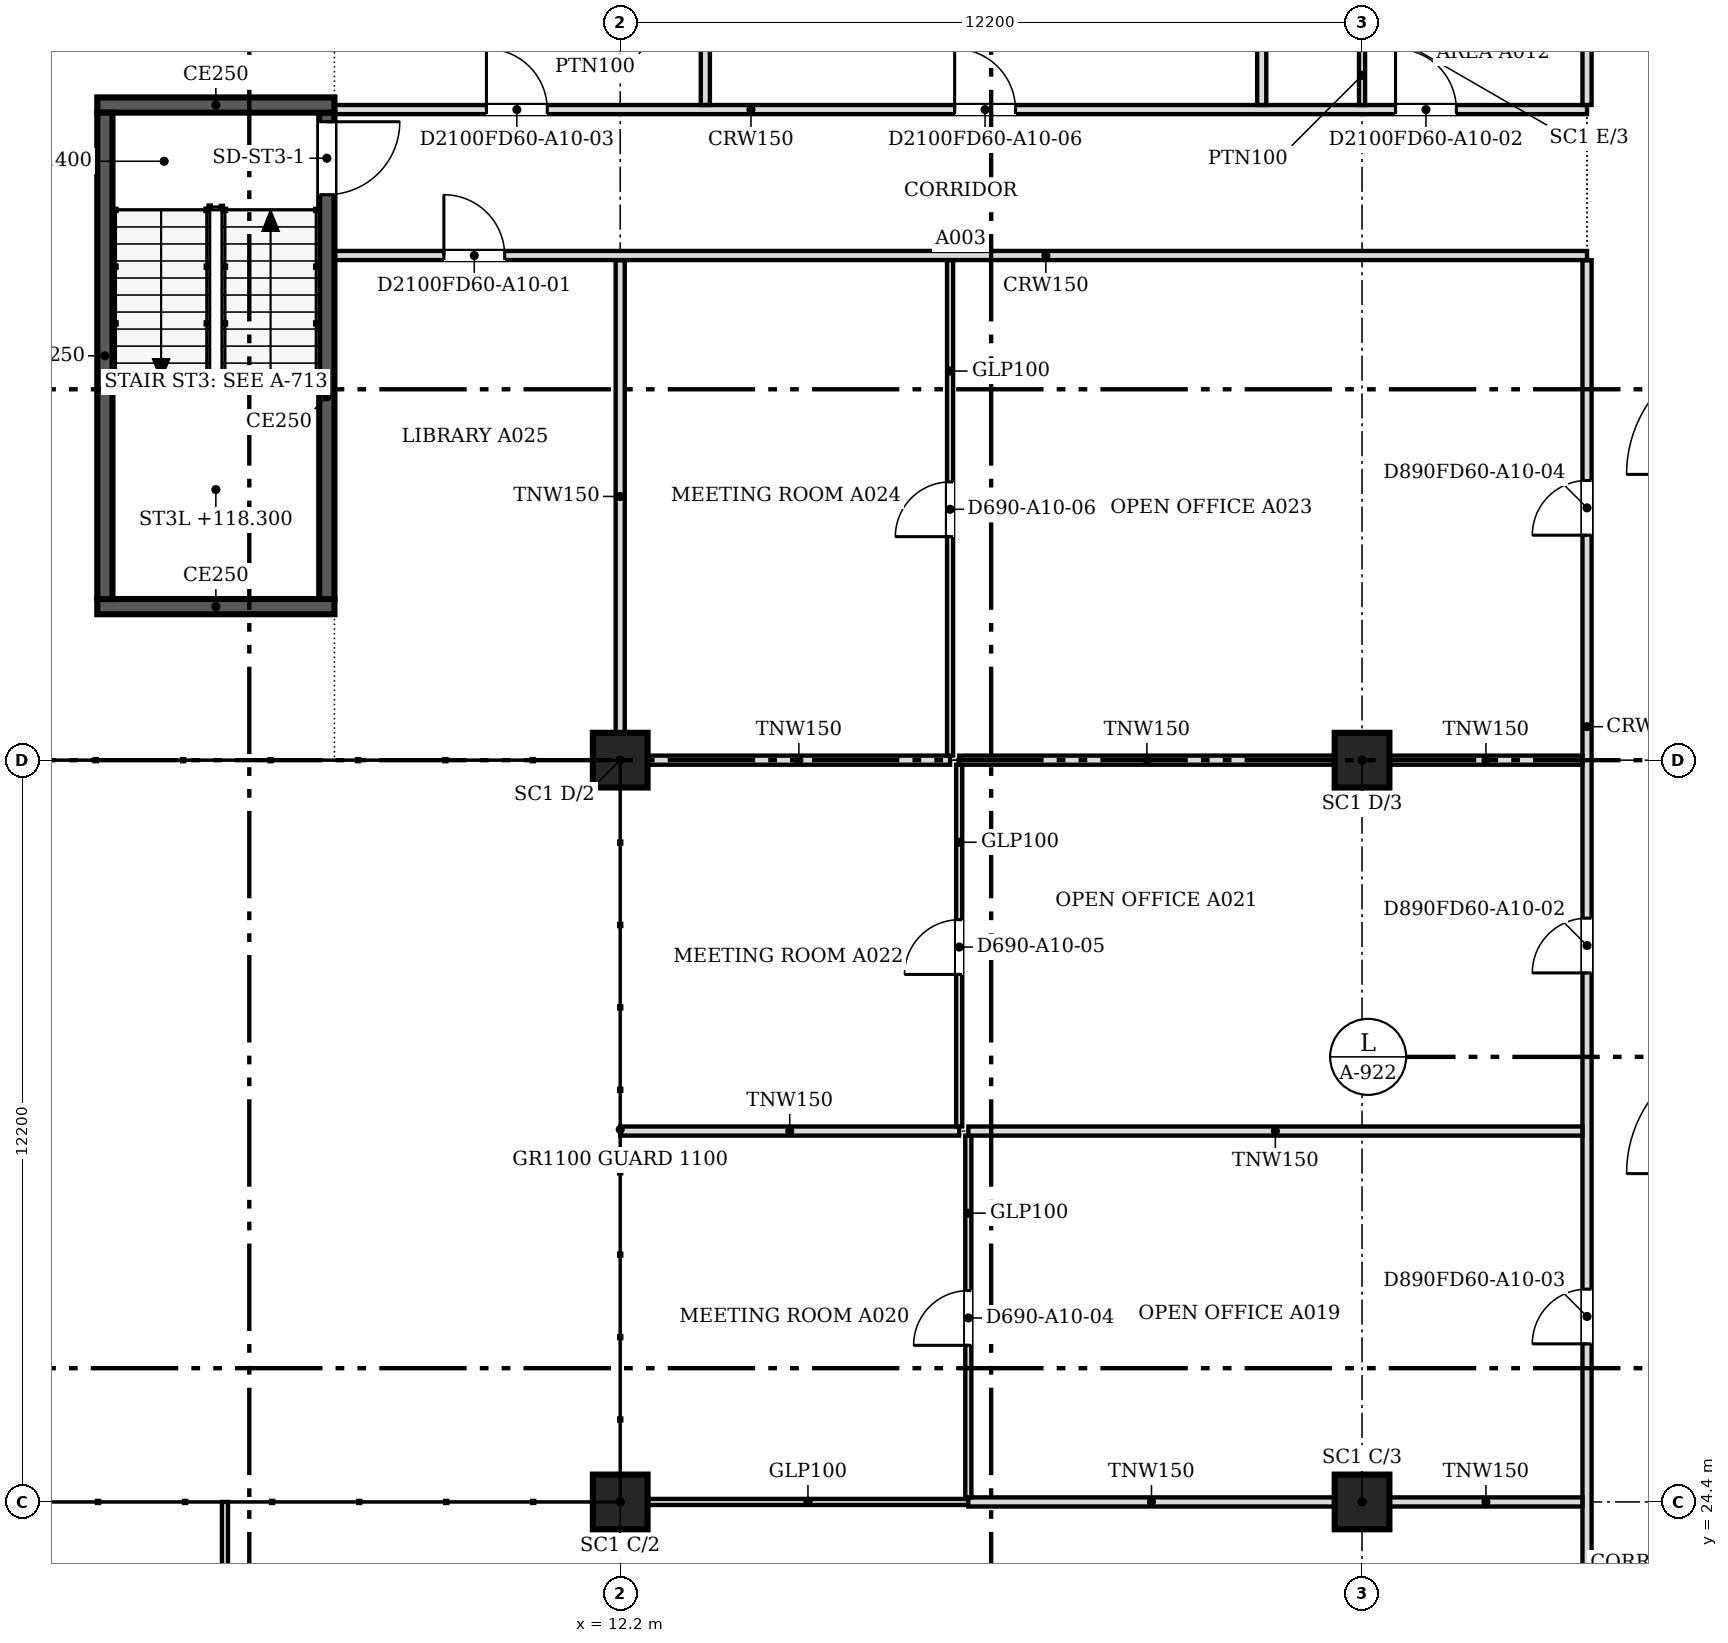
"""IFC4 building model, lengths in metres.
Left out: names, types, materials, properties, quantities, classifications, styles, units other than length and angle.
Written with IfcOpenShell. Run it as: python <this file> out.ifc"""

import sys

from ifc_helpers import new_model, si_unit, direction, frame, frame_2d, origin, origin_2d, place, context, subcontext, project, spatial, rectangle, extrude, source, transform, mapped, element, fill, save


model = new_model("IFC4")
c1 = context("Model", 3, precision=1e-05, world=origin(), true_north=direction((0.0, 1.0)))
c2 = subcontext(c1, "Body", "Model", "MODEL_VIEW")
j1 = project(units=[si_unit("LENGTHUNIT", "METRE"), si_unit("PLANEANGLEUNIT", "RADIAN")], contexts=[c1])
p1 = place(None, origin())
s1 = spatial("IfcSite", under=j1, at=p1, CompositionType="ELEMENT")
p2 = place(p1, origin())
s2 = spatial("IfcBuilding", under=s1, at=p2, CompositionType="ELEMENT")
p3 = place(p2, frame((0.0, 0.0, 116.4)))
s3 = spatial("IfcBuildingStorey", under=s2, at=p3, CompositionType="ELEMENT", Elevation=116.4)
for number, where, z_axis, x_axis in (
    (1, (12.2, 24.4, 0.0), (0.0, 0.0, 1.0), (1.0, 0.0, 0.0)),
    (2, (12.2, 36.6, 0.0), (0.0, 0.0, 1.0), (1.0, 0.0, 0.0)),
    (3, (24.4, 24.4, 0.0), (0.0, 0.0, 1.0), (1.0, 0.0, 0.0)),
    (4, (24.4, 36.6, 0.0), (0.0, 0.0, 1.0), (1.0, 0.0, 0.0)),
):
    element("IfcColumn", number, at=place(p3, frame(where, z_axis=z_axis, x_axis=x_axis)), inside=s3, PredefinedType="COLUMN", context=c2, shape_type="SweptSolid", body=[
        extrude(rectangle(XDim=0.9, YDim=0.9, at=origin_2d()), origin(), (0.0, 0.0, 1.0), 3.6),
    ])
p4 = place(p3, frame((7.5, 39.125, 0.0), z_axis=(0.0, 0.0, 1.0), x_axis=(-1.0, 0.0, 0.0)))
e5 = element("IfcWall", 5, at=p4, inside=s3, PredefinedType="SOLIDWALL", context=c2, shape_type="SweptSolid", body=[
    extrude(rectangle(XDim=3.9, YDim=0.25, at=frame_2d((1.95, 0.0))), origin(), (0.0, 0.0, 1.0), 3.8),
])
p5 = place(p3, frame((3.725, 39.25, 0.0), z_axis=(0.0, 0.0, 1.0), x_axis=(0.0, 1.0, 0.0)))
e6 = element("IfcWall", 6, at=p5, inside=s3, PredefinedType="SOLIDWALL", context=c2, shape_type="SweptSolid", body=[
    extrude(rectangle(XDim=8.0, YDim=0.25, at=frame_2d((4.0, 0.0))), origin(), (0.0, 0.0, 1.0), 3.8),
])
p6 = place(p3, frame((3.6, 47.375, 0.0), z_axis=(0.0, 0.0, 1.0), x_axis=(1.0, 0.0, 0.0)))
e7 = element("IfcWall", 7, at=p6, inside=s3, PredefinedType="SOLIDWALL", context=c2, shape_type="SweptSolid", body=[
    extrude(rectangle(XDim=3.9, YDim=0.25, at=frame_2d((1.95, 0.0))), origin(), (0.0, 0.0, 1.0), 3.8),
])
p7 = place(p3, frame((7.375, 47.25, 0.0), z_axis=(0.0, 0.0, 1.0), x_axis=(0.0, -1.0, 0.0)))
e8 = element("IfcWall", 8, at=p7, inside=s3, PredefinedType="SOLIDWALL", context=c2, shape_type="SweptSolid", body=[
    extrude(rectangle(XDim=8.0, YDim=0.25, at=frame_2d((4.0, 0.0))), origin(), (0.0, 0.0, 1.0), 3.8),
])
m1 = source(origin(), c2, "Body", "SweptSolid", [
    extrude(rectangle(XDim=1.2, YDim=2.1, at=frame_2d((0.6, 1.05))), frame((0.0, 0.135, 0.0), z_axis=(0.0, -1.0, 0.0), x_axis=(1.0, 0.0, 0.0)), (0.0, 0.0, 1.0), 0.27),
])
p8 = place(p7, frame((0.15, 0.0, 0.0)))
e9 = element("IfcOpeningElement", 9, at=p8, cuts=e8, PredefinedType="OPENING", context=c2, shape_type="MappedRepresentation", body=[
    mapped(m1, transform((0.0, 0.0, 0.0), scale=1.0)),
])
p9 = place(p3, frame((28.1, 18.8, 0.0), z_axis=(0.0, 0.0, 1.0), x_axis=(0.0, 1.0, 0.0)))
e10 = element("IfcWall", 10, at=p9, inside=s3, PredefinedType="PARTITIONING", context=c2, shape_type="SweptSolid", body=[
    extrude(rectangle(XDim=26.024, YDim=0.15, at=frame_2d((13.012, 0.0))), origin(), (0.0, 0.0, 1.0), 3.067),
])
m2 = source(origin(), c2, "Body", "SweptSolid", [
    extrude(rectangle(XDim=0.9, YDim=2.1, at=frame_2d((0.45, 1.05))), frame((0.0, 0.085, 0.0), z_axis=(0.0, -1.0, 0.0), x_axis=(1.0, 0.0, 0.0)), (0.0, 0.0, 1.0), 0.17),
])
p10 = place(p9, frame((1.1, 0.0, 0.0)))
e11 = element("IfcOpeningElement", 11, at=p10, cuts=e10, PredefinedType="OPENING", context=c2, shape_type="MappedRepresentation", body=[
    mapped(m2, transform((0.0, 0.0, 0.0), scale=1.0)),
])
p11 = place(p9, frame((14.301, 0.0, 0.0)))
e12 = element("IfcOpeningElement", 12, at=p11, cuts=e10, PredefinedType="OPENING", context=c2, shape_type="MappedRepresentation", body=[
    mapped(m2, transform((0.0, 0.0, 0.0), scale=1.0)),
])
p12 = place(p9, frame((8.2, 0.0, 0.0)))
e13 = element("IfcOpeningElement", 13, at=p12, cuts=e10, PredefinedType="OPENING", context=c2, shape_type="MappedRepresentation", body=[
    mapped(m2, transform((0.0, 0.0, 0.0), scale=1.0)),
])
p13 = place(p9, frame((21.5, 0.0, 0.0)))
e14 = element("IfcOpeningElement", 14, at=p13, cuts=e10, PredefinedType="OPENING", context=c2, shape_type="MappedRepresentation", body=[
    mapped(m2, transform((0.0, 0.0, 0.0), scale=1.0)),
])
p14 = place(p3, frame((5.7, 18.99, 0.0), z_axis=(0.0, 0.0, 1.0), x_axis=(0.0, 1.0, 0.0)))
e15 = element("IfcWall", 15, at=p14, inside=s3, PredefinedType="PARTITIONING", context=c2, shape_type="SweptSolid", body=[
    extrude(rectangle(XDim=5.41, YDim=0.1, at=frame_2d((2.705, 0.0))), origin(), (0.0, 0.0, 1.0), 3.067),
])
m3 = source(origin(), c2, "Body", "SweptSolid", [
    extrude(rectangle(XDim=0.9, YDim=2.1, at=frame_2d((0.45, 1.05))), frame((0.0, 0.06, 0.0), z_axis=(0.0, -1.0, 0.0), x_axis=(1.0, 0.0, 0.0)), (0.0, 0.0, 1.0), 0.12),
])
p15 = place(p14, frame((2.3, 0.0, 0.0)))
e16 = element("IfcOpeningElement", 16, at=p15, cuts=e15, PredefinedType="OPENING", context=c2, shape_type="MappedRepresentation", body=[
    mapped(m3, transform((0.0, 0.0, 0.0), scale=1.0)),
])
p16 = place(p3, frame((12.651, 24.4, 0.0), z_axis=(0.0, 0.0, 1.0), x_axis=(1.0, 0.0, 0.0)))
e17 = element("IfcWall", 17, at=p16, inside=s3, PredefinedType="PARTITIONING", context=c2, shape_type="SweptSolid", body=[
    extrude(rectangle(XDim=5.273, YDim=0.1, at=frame_2d((2.637, 0.0))), origin(), (0.0, 0.0, 1.0), 3.067),
])
p17 = place(p3, frame((17.925, 24.4, 0.0), z_axis=(0.0, 0.0, 1.0), x_axis=(1.0, 0.0, 0.0)))
e18 = element("IfcWall", 18, at=p17, inside=s3, PredefinedType="PARTITIONING", context=c2, shape_type="SweptSolid", body=[
    extrude(rectangle(XDim=6.024, YDim=0.15, at=frame_2d((3.012, 0.0))), origin(), (0.0, 0.0, 1.0), 3.067),
])
p18 = place(p3, frame((24.851, 24.4, 0.0), z_axis=(0.0, 0.0, 1.0), x_axis=(1.0, 0.0, 0.0)))
e19 = element("IfcWall", 19, at=p18, inside=s3, PredefinedType="PARTITIONING", context=c2, shape_type="SweptSolid", body=[
    extrude(rectangle(XDim=3.173, YDim=0.15, at=frame_2d((1.586, 0.0))), origin(), (0.0, 0.0, 1.0), 3.067),
])
p19 = place(p3, frame((17.925, 24.476, 0.0), z_axis=(0.0, 0.0, 1.0), x_axis=(0.0, 1.0, 0.0)))
e20 = element("IfcWall", 20, at=p19, inside=s3, PredefinedType="PARTITIONING", context=c2, shape_type="SweptSolid", body=[
    extrude(rectangle(XDim=5.948, YDim=0.1, at=frame_2d((2.974, 0.0))), origin(), (0.0, 0.0, 1.0), 3.067),
])
p20 = place(p19, frame((2.5, 0.0, 0.0)))
e21 = element("IfcOpeningElement", 21, at=p20, cuts=e20, PredefinedType="OPENING", context=c2, shape_type="MappedRepresentation", body=[
    mapped(m3, transform((0.0, 0.0, 0.0), scale=1.0)),
])
p21 = place(p3, frame((12.2, 30.5, 0.0), z_axis=(0.0, 0.0, 1.0), x_axis=(1.0, 0.0, 0.0)))
e22 = element("IfcWall", 22, at=p21, inside=s3, PredefinedType="PARTITIONING", context=c2, shape_type="SweptSolid", body=[
    extrude(rectangle(XDim=5.575, YDim=0.15, at=frame_2d((2.788, 0.0))), origin(), (0.0, 0.0, 1.0), 3.067),
])
p22 = place(p3, frame((17.925, 30.5, 0.0), z_axis=(0.0, 0.0, 1.0), x_axis=(1.0, 0.0, 0.0)))
e23 = element("IfcWall", 23, at=p22, inside=s3, PredefinedType="PARTITIONING", context=c2, shape_type="SweptSolid", body=[
    extrude(rectangle(XDim=10.099, YDim=0.15, at=frame_2d((5.049, 0.0))), origin(), (0.0, 0.0, 1.0), 3.067),
])
p23 = place(p3, frame((17.775, 30.576, 0.0), z_axis=(0.0, 0.0, 1.0), x_axis=(0.0, 1.0, 0.0)))
e24 = element("IfcWall", 24, at=p23, inside=s3, PredefinedType="PARTITIONING", context=c2, shape_type="SweptSolid", body=[
    extrude(rectangle(XDim=5.948, YDim=0.1, at=frame_2d((2.974, 0.0))), origin(), (0.0, 0.0, 1.0), 3.067),
])
p24 = place(p23, frame((2.5, 0.0, 0.0)))
e25 = element("IfcOpeningElement", 25, at=p24, cuts=e24, PredefinedType="OPENING", context=c2, shape_type="MappedRepresentation", body=[
    mapped(m3, transform((0.0, 0.0, 0.0), scale=1.0)),
])
p25 = place(p3, frame((12.651, 36.6, 0.0), z_axis=(0.0, 0.0, 1.0), x_axis=(1.0, 0.0, 0.0)))
e26 = element("IfcWall", 26, at=p25, inside=s3, PredefinedType="PARTITIONING", context=c2, shape_type="SweptSolid", body=[
    extrude(rectangle(XDim=4.974, YDim=0.15, at=frame_2d((2.487, 0.0))), origin(), (0.0, 0.0, 1.0), 3.067),
])
p26 = place(p3, frame((17.775, 36.6, 0.0), z_axis=(0.0, 0.0, 1.0), x_axis=(1.0, 0.0, 0.0)))
e27 = element("IfcWall", 27, at=p26, inside=s3, PredefinedType="PARTITIONING", context=c2, shape_type="SweptSolid", body=[
    extrude(rectangle(XDim=6.174, YDim=0.15, at=frame_2d((3.087, 0.0))), origin(), (0.0, 0.0, 1.0), 3.067),
])
p27 = place(p3, frame((24.851, 36.6, 0.0), z_axis=(0.0, 0.0, 1.0), x_axis=(1.0, 0.0, 0.0)))
e28 = element("IfcWall", 28, at=p27, inside=s3, PredefinedType="PARTITIONING", context=c2, shape_type="SweptSolid", body=[
    extrude(rectangle(XDim=3.173, YDim=0.15, at=frame_2d((1.586, 0.0))), origin(), (0.0, 0.0, 1.0), 3.067),
])
p28 = place(p3, frame((17.625, 36.676, 0.0), z_axis=(0.0, 0.0, 1.0), x_axis=(0.0, 1.0, 0.0)))
e29 = element("IfcWall", 29, at=p28, inside=s3, PredefinedType="PARTITIONING", context=c2, shape_type="SweptSolid", body=[
    extrude(rectangle(XDim=8.148, YDim=0.1, at=frame_2d((4.074, 0.0))), origin(), (0.0, 0.0, 1.0), 3.067),
])
p29 = place(p28, frame((3.6, 0.0, 0.0)))
e30 = element("IfcOpeningElement", 30, at=p29, cuts=e29, PredefinedType="OPENING", context=c2, shape_type="MappedRepresentation", body=[
    mapped(m3, transform((0.0, 0.0, 0.0), scale=1.0)),
])
p30 = place(p3, frame((12.2, 37.051, 0.0), z_axis=(0.0, 0.0, 1.0), x_axis=(0.0, 1.0, 0.0)))
e31 = element("IfcWall", 31, at=p30, inside=s3, PredefinedType="PARTITIONING", context=c2, shape_type="SweptSolid", body=[
    extrude(rectangle(XDim=7.773, YDim=0.15, at=frame_2d((3.886, 0.0))), origin(), (0.0, 0.0, 1.0), 3.067),
])
p31 = place(p3, frame((28.1, 44.9, 0.0), z_axis=(0.0, 0.0, 1.0), x_axis=(-1.0, 0.0, 0.0)))
e32 = element("IfcWall", 32, at=p31, inside=s3, PredefinedType="PARTITIONING", context=c2, shape_type="SweptSolid", body=[
    extrude(rectangle(XDim=20.6, YDim=0.15, at=frame_2d((10.3, 0.0))), origin(), (0.0, 0.0, 1.0), 3.067),
])
m4 = source(origin(), c2, "Body", "SweptSolid", [
    extrude(rectangle(XDim=1.0, YDim=2.1, at=frame_2d((0.5, 1.05))), frame((0.0, 0.085, 0.0), z_axis=(0.0, -1.0, 0.0), x_axis=(1.0, 0.0, 0.0)), (0.0, 0.0, 1.0), 0.17),
])
p32 = place(p31, frame((17.8, 0.0, 0.0)))
e33 = element("IfcOpeningElement", 33, at=p32, cuts=e32, PredefinedType="OPENING", context=c2, shape_type="MappedRepresentation", body=[
    mapped(m4, transform((0.0, 0.0, 0.0), scale=1.0)),
])
p33 = place(p3, frame((7.5, 47.3, 0.0), z_axis=(0.0, 0.0, 1.0), x_axis=(1.0, 0.0, 0.0)))
e34 = element("IfcWall", 34, at=p33, inside=s3, PredefinedType="PARTITIONING", context=c2, shape_type="SweptSolid", body=[
    extrude(rectangle(XDim=20.6, YDim=0.15, at=frame_2d((10.3, 0.0))), origin(), (0.0, 0.0, 1.0), 3.067),
])
p34 = place(p33, frame((17.451, 0.0, 0.0)))
e35 = element("IfcOpeningElement", 35, at=p34, cuts=e34, PredefinedType="OPENING", context=c2, shape_type="MappedRepresentation", body=[
    mapped(m4, transform((0.0, 0.0, 0.0), scale=1.0)),
])
p35 = place(p33, frame((2.5, 0.0, 0.0)))
e36 = element("IfcOpeningElement", 36, at=p35, cuts=e34, PredefinedType="OPENING", context=c2, shape_type="MappedRepresentation", body=[
    mapped(m4, transform((0.0, 0.0, 0.0), scale=1.0)),
])
p36 = place(p33, frame((10.2, 0.0, 0.0)))
e37 = element("IfcOpeningElement", 37, at=p36, cuts=e34, PredefinedType="OPENING", context=c2, shape_type="MappedRepresentation", body=[
    mapped(m4, transform((0.0, 0.0, 0.0), scale=1.0)),
])
p37 = place(p3, frame((13.6, 47.376, 0.0), z_axis=(0.0, 0.0, 1.0), x_axis=(0.0, 1.0, 0.0)))
e38 = element("IfcWall", 38, at=p37, inside=s3, PredefinedType="PARTITIONING", context=c2, shape_type="SweptSolid", body=[
    extrude(rectangle(XDim=3.498, YDim=0.15, at=frame_2d((1.749, 0.0))), origin(), (0.0, 0.0, 1.0), 3.067),
])
p38 = place(p3, frame((22.75, 47.376, 0.0), z_axis=(0.0, 0.0, 1.0), x_axis=(0.0, 1.0, 0.0)))
e39 = element("IfcWall", 39, at=p38, inside=s3, PredefinedType="PARTITIONING", context=c2, shape_type="SweptSolid", body=[
    extrude(rectangle(XDim=2.948, YDim=0.15, at=frame_2d((1.474, 0.0))), origin(), (0.0, 0.0, 1.0), 3.067),
])
p39 = place(p3, frame((28.1, 47.376, 0.0), z_axis=(0.0, 0.0, 1.0), x_axis=(0.0, 1.0, 0.0)))
e40 = element("IfcWall", 40, at=p39, inside=s3, PredefinedType="PARTITIONING", context=c2, shape_type="SweptSolid", body=[
    extrude(rectangle(XDim=3.748, YDim=0.15, at=frame_2d((1.874, 0.0))), origin(), (0.0, 0.0, 1.0), 3.067),
])
p40 = place(p3, frame((24.4, 48.35, 0.0), z_axis=(0.0, 0.0, 1.0), x_axis=(0.0, -1.0, 0.0)))
e41 = element("IfcWall", 41, at=p40, inside=s3, PredefinedType="PARTITIONING", context=c2, shape_type="SweptSolid", body=[
    extrude(rectangle(XDim=0.975, YDim=0.1, at=frame_2d((0.488, 0.0))), origin(), (0.0, 0.0, 1.0), 3.067),
])
m5 = source(origin(), c2, "Body", "SweptSolid", [
    extrude(rectangle(XDim=1.2, YDim=2.1, at=frame_2d((0.6, 1.05))), frame((0.0, 0.025, 0.0), z_axis=(0.0, -1.0, 0.0), x_axis=(1.0, 0.0, 0.0)), (0.0, 0.0, 1.0), 0.05),
])
p41 = place(p8, origin())
e42 = element("IfcDoor", 42, at=p41, inside=s3, OperationType="SINGLE_SWING_LEFT", PredefinedType="DOOR", context=c2, shape_type="MappedRepresentation", body=[
    mapped(m5, transform((0.0, 0.0, 0.0), scale=1.0)),
])
fill(e9, e42)
m6 = source(origin(), c2, "Body", "SweptSolid", [
    extrude(rectangle(XDim=1.0, YDim=2.1, at=frame_2d((0.5, 1.05))), frame((0.0, 0.025, 0.0), z_axis=(0.0, -1.0, 0.0), x_axis=(1.0, 0.0, 0.0)), (0.0, 0.0, 1.0), 0.05),
])
p42 = place(p32, origin())
e43 = element("IfcDoor", 43, at=p42, inside=s3, OperationType="SINGLE_SWING_RIGHT", PredefinedType="DOOR", context=c2, shape_type="MappedRepresentation", body=[
    mapped(m6, transform((0.0, 0.0, 0.0), scale=1.0)),
])
fill(e33, e43)
p43 = place(p34, origin())
e44 = element("IfcDoor", 44, at=p43, inside=s3, OperationType="SINGLE_SWING_LEFT", PredefinedType="DOOR", context=c2, shape_type="MappedRepresentation", body=[
    mapped(m6, transform((0.0, 0.0, 0.0), scale=1.0)),
])
fill(e35, e44)
m7 = source(origin(), c2, "Body", "SweptSolid", [
    extrude(rectangle(XDim=0.9, YDim=2.1, at=frame_2d((0.45, 1.05))), frame((0.0, 0.025, 0.0), z_axis=(0.0, -1.0, 0.0), x_axis=(1.0, 0.0, 0.0)), (0.0, 0.0, 1.0), 0.05),
])
p44 = place(p20, origin())
e45 = element("IfcDoor", 45, at=p44, inside=s3, OperationType="SINGLE_SWING_LEFT", PredefinedType="DOOR", context=c2, shape_type="MappedRepresentation", body=[
    mapped(m7, transform((0.0, 0.0, 0.0), scale=1.0)),
])
fill(e21, e45)
p45 = place(p24, origin())
e46 = element("IfcDoor", 46, at=p45, inside=s3, OperationType="SINGLE_SWING_LEFT", PredefinedType="DOOR", context=c2, shape_type="MappedRepresentation", body=[
    mapped(m7, transform((0.0, 0.0, 0.0), scale=1.0)),
])
fill(e25, e46)
p46 = place(p11, origin())
e47 = element("IfcDoor", 47, at=p46, inside=s3, OperationType="SINGLE_SWING_LEFT", PredefinedType="DOOR", context=c2, shape_type="MappedRepresentation", body=[
    mapped(m7, transform((0.0, 0.0, 0.0), scale=1.0)),
])
fill(e12, e47)
p47 = place(p35, origin())
e48 = element("IfcDoor", 48, at=p47, inside=s3, OperationType="SINGLE_SWING_LEFT", PredefinedType="DOOR", context=c2, shape_type="MappedRepresentation", body=[
    mapped(m6, transform((0.0, 0.0, 0.0), scale=1.0)),
])
fill(e36, e48)
p48 = place(p12, origin())
e49 = element("IfcDoor", 49, at=p48, inside=s3, OperationType="SINGLE_SWING_LEFT", PredefinedType="DOOR", context=c2, shape_type="MappedRepresentation", body=[
    mapped(m7, transform((0.0, 0.0, 0.0), scale=1.0)),
])
fill(e13, e49)
p49 = place(p29, origin())
e50 = element("IfcDoor", 50, at=p49, inside=s3, OperationType="SINGLE_SWING_LEFT", PredefinedType="DOOR", context=c2, shape_type="MappedRepresentation", body=[
    mapped(m7, transform((0.0, 0.0, 0.0), scale=1.0)),
])
fill(e30, e50)
p50 = place(p13, origin())
e51 = element("IfcDoor", 51, at=p50, inside=s3, OperationType="SINGLE_SWING_LEFT", PredefinedType="DOOR", context=c2, shape_type="MappedRepresentation", body=[
    mapped(m7, transform((0.0, 0.0, 0.0), scale=1.0)),
])
fill(e14, e51)
p51 = place(p36, origin())
e52 = element("IfcDoor", 52, at=p51, inside=s3, OperationType="SINGLE_SWING_LEFT", PredefinedType="DOOR", context=c2, shape_type="MappedRepresentation", body=[
    mapped(m6, transform((0.0, 0.0, 0.0), scale=1.0)),
])
fill(e37, e52)
save(model, sys.argv[1])
